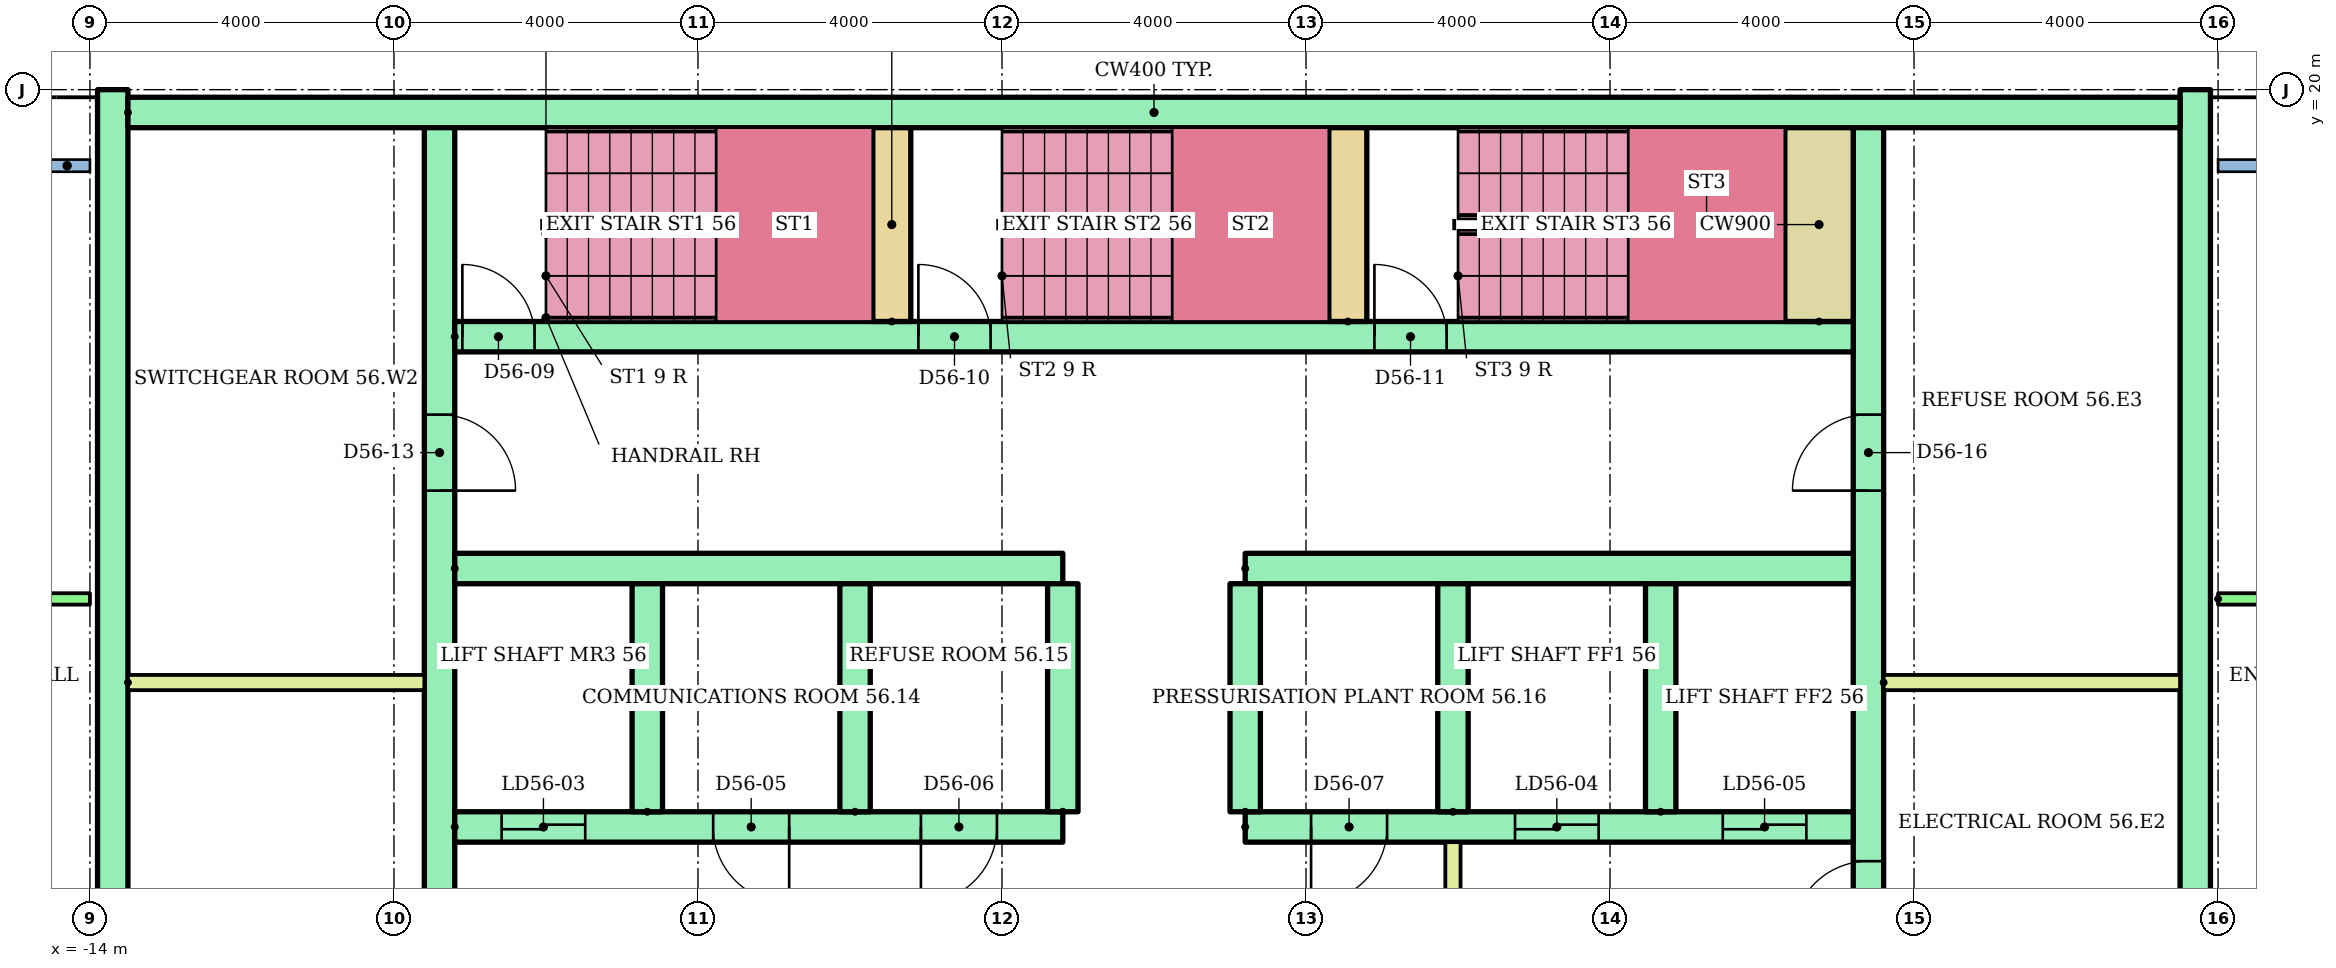
"""IFC4 building model, lengths in metres.
Left out: names, types, materials, properties, quantities, classifications, styles, units other than length and angle.
Written with IfcOpenShell. Run it as: python <this file> out.ifc"""

import sys

from ifc_helpers import new_model, si_unit, direction, frame, frame_2d, origin, place, context, subcontext, project, spatial, rectangle, extrude, element, fill, save


model = new_model("IFC4")
c1 = context("Model", 3, precision=1e-05, world=origin(), true_north=direction((0.0, 1.0)))
c2 = subcontext(c1, "Body", "Model", "MODEL_VIEW")
j1 = project(units=[si_unit("LENGTHUNIT", "METRE"), si_unit("PLANEANGLEUNIT", "RADIAN")], contexts=[c1])
p1 = place(None, origin())
s1 = spatial("IfcSite", under=j1, at=p1, CompositionType="ELEMENT")
p2 = place(p1, origin())
s2 = spatial("IfcBuilding", under=s1, at=p2, CompositionType="ELEMENT")
p3 = place(p2, frame((0.0, 0.0, 217.2)))
s3 = spatial("IfcBuildingStorey", under=s2, at=p3, CompositionType="ELEMENT", Elevation=217.2)
for number, where, z_axis, x_axis in (
    (1, (-13.7, 3.0, 0.0), (0.0, 0.0, 1.0), (0.0, 1.0, 0.0)),
    (2, (13.7, 3.0, 0.0), (0.0, 0.0, 1.0), (0.0, 1.0, 0.0)),
):
    element("IfcWall", number, at=place(p3, frame(where, z_axis=z_axis, x_axis=x_axis)), inside=s3, PredefinedType="SHEAR", context=c2, shape_type="SweptSolid", body=[
        extrude(rectangle(XDim=17.0, YDim=0.4, at=frame_2d((8.5, 0.0))), origin(), (0.0, 0.0, 1.0), 2.92),
    ])
p4 = place(p3, frame((-13.5, 19.7, 0.0)))
e3 = element("IfcWall", 3, at=p4, inside=s3, PredefinedType="SHEAR", context=c2, shape_type="SweptSolid", body=[
    extrude(rectangle(XDim=27.0, YDim=0.4, at=frame_2d((13.5, 0.0))), origin(), (0.0, 0.0, 1.0), 2.92),
])
p5 = place(p3, frame((-9.4, 6.8, 0.0), z_axis=(0.0, 0.0, 1.0), x_axis=(0.0, 1.0, 0.0)))
e4 = element("IfcWall", 4, at=p5, inside=s3, PredefinedType="SHEAR", context=c2, shape_type="SweptSolid", body=[
    extrude(rectangle(XDim=12.7, YDim=0.4, at=frame_2d((6.35, 0.0))), origin(), (0.0, 0.0, 1.0), 2.92),
])
p6 = place(p5, frame((1.15, 0.0, 0.0)))
e5 = element("IfcOpeningElement", 5, at=p6, cuts=e4, PredefinedType="OPENING", context=c2, shape_type="SweptSolid", body=[
    extrude(rectangle(XDim=1.0, YDim=2.1, at=frame_2d((0.5, 1.05))), frame((0.0, 0.21, 0.0), z_axis=(0.0, -1.0, 0.0), x_axis=(1.0, 0.0, 0.0)), (0.0, 0.0, 1.0), 0.42),
])
p7 = place(p5, frame((7.925, 0.0, 0.0)))
e6 = element("IfcOpeningElement", 6, at=p7, cuts=e4, PredefinedType="OPENING", context=c2, shape_type="SweptSolid", body=[
    extrude(rectangle(XDim=1.0, YDim=2.1, at=frame_2d((0.5, 1.05))), frame((0.0, 0.21, 0.0), z_axis=(0.0, -1.0, 0.0), x_axis=(1.0, 0.0, 0.0)), (0.0, 0.0, 1.0), 0.42),
])
p8 = place(p3, frame((9.4, 6.8, 0.0), z_axis=(0.0, 0.0, 1.0), x_axis=(0.0, 1.0, 0.0)))
e7 = element("IfcWall", 7, at=p8, inside=s3, PredefinedType="SHEAR", context=c2, shape_type="SweptSolid", body=[
    extrude(rectangle(XDim=12.7, YDim=0.4, at=frame_2d((6.35, 0.0))), origin(), (0.0, 0.0, 1.0), 2.92),
])
p9 = place(p8, frame((0.3, 0.0, 0.0)))
e8 = element("IfcOpeningElement", 8, at=p9, cuts=e7, PredefinedType="OPENING", context=c2, shape_type="SweptSolid", body=[
    extrude(rectangle(XDim=1.0, YDim=2.1, at=frame_2d((0.5, 1.05))), frame((0.0, 0.21, 0.0), z_axis=(0.0, -1.0, 0.0), x_axis=(1.0, 0.0, 0.0)), (0.0, 0.0, 1.0), 0.42),
])
p10 = place(p8, frame((2.05, 0.0, 0.0)))
e9 = element("IfcOpeningElement", 9, at=p10, cuts=e7, PredefinedType="OPENING", context=c2, shape_type="SweptSolid", body=[
    extrude(rectangle(XDim=1.0, YDim=2.1, at=frame_2d((0.5, 1.05))), frame((0.0, 0.21, 0.0), z_axis=(0.0, -1.0, 0.0), x_axis=(1.0, 0.0, 0.0)), (0.0, 0.0, 1.0), 0.42),
])
p11 = place(p8, frame((7.925, 0.0, 0.0)))
e10 = element("IfcOpeningElement", 10, at=p11, cuts=e7, PredefinedType="OPENING", context=c2, shape_type="SweptSolid", body=[
    extrude(rectangle(XDim=1.0, YDim=2.1, at=frame_2d((0.5, 1.05))), frame((0.0, 0.21, 0.0), z_axis=(0.0, -1.0, 0.0), x_axis=(1.0, 0.0, 0.0)), (0.0, 0.0, 1.0), 0.42),
])
p12 = place(p3, frame((-9.2, 10.3, 0.0)))
e11 = element("IfcWall", 11, at=p12, inside=s3, PredefinedType="SHEAR", context=c2, shape_type="SweptSolid", body=[
    extrude(rectangle(XDim=8.0, YDim=0.4, at=frame_2d((4.0, 0.0))), origin(), (0.0, 0.0, 1.0), 2.92),
])
p13 = place(p12, frame((0.617, 0.0, 0.0)))
e12 = element("IfcOpeningElement", 12, at=p13, cuts=e11, PredefinedType="OPENING", context=c2, shape_type="SweptSolid", body=[
    extrude(rectangle(XDim=1.1, YDim=2.1, at=frame_2d((0.55, 1.05))), frame((0.0, 0.21, 0.0), z_axis=(0.0, -1.0, 0.0), x_axis=(1.0, 0.0, 0.0)), (0.0, 0.0, 1.0), 0.42),
])
p14 = place(p12, frame((3.4, 0.0, 0.0)))
e13 = element("IfcOpeningElement", 13, at=p14, cuts=e11, PredefinedType="OPENING", context=c2, shape_type="SweptSolid", body=[
    extrude(rectangle(XDim=1.0, YDim=2.1, at=frame_2d((0.5, 1.05))), frame((0.0, 0.21, 0.0), z_axis=(0.0, -1.0, 0.0), x_axis=(1.0, 0.0, 0.0)), (0.0, 0.0, 1.0), 0.42),
])
p15 = place(p12, frame((6.133, 0.0, 0.0)))
e14 = element("IfcOpeningElement", 14, at=p15, cuts=e11, PredefinedType="OPENING", context=c2, shape_type="SweptSolid", body=[
    extrude(rectangle(XDim=1.0, YDim=2.1, at=frame_2d((0.5, 1.05))), frame((0.0, 0.21, 0.0), z_axis=(0.0, -1.0, 0.0), x_axis=(1.0, 0.0, 0.0)), (0.0, 0.0, 1.0), 0.42),
])
p16 = place(p3, frame((-9.2, 13.7, 0.0)))
e15 = element("IfcWall", 15, at=p16, inside=s3, PredefinedType="SHEAR", context=c2, shape_type="SweptSolid", body=[
    extrude(rectangle(XDim=8.0, YDim=0.4, at=frame_2d((4.0, 0.0))), origin(), (0.0, 0.0, 1.0), 2.92),
])
p17 = place(p3, frame((1.2, 10.3, 0.0)))
e16 = element("IfcWall", 16, at=p17, inside=s3, PredefinedType="SHEAR", context=c2, shape_type="SweptSolid", body=[
    extrude(rectangle(XDim=8.0, YDim=0.4, at=frame_2d((4.0, 0.0))), origin(), (0.0, 0.0, 1.0), 2.92),
])
p18 = place(p17, frame((3.55, 0.0, 0.0)))
e17 = element("IfcOpeningElement", 17, at=p18, cuts=e16, PredefinedType="OPENING", context=c2, shape_type="SweptSolid", body=[
    extrude(rectangle(XDim=1.1, YDim=2.1, at=frame_2d((0.55, 1.05))), frame((0.0, 0.21, 0.0), z_axis=(0.0, -1.0, 0.0), x_axis=(1.0, 0.0, 0.0)), (0.0, 0.0, 1.0), 0.42),
])
p19 = place(p17, frame((6.283, 0.0, 0.0)))
e18 = element("IfcOpeningElement", 18, at=p19, cuts=e16, PredefinedType="OPENING", context=c2, shape_type="SweptSolid", body=[
    extrude(rectangle(XDim=1.1, YDim=2.1, at=frame_2d((0.55, 1.05))), frame((0.0, 0.21, 0.0), z_axis=(0.0, -1.0, 0.0), x_axis=(1.0, 0.0, 0.0)), (0.0, 0.0, 1.0), 0.42),
])
p20 = place(p17, frame((0.867, 0.0, 0.0)))
e19 = element("IfcOpeningElement", 19, at=p20, cuts=e16, PredefinedType="OPENING", context=c2, shape_type="SweptSolid", body=[
    extrude(rectangle(XDim=1.0, YDim=2.1, at=frame_2d((0.5, 1.05))), frame((0.0, 0.21, 0.0), z_axis=(0.0, -1.0, 0.0), x_axis=(1.0, 0.0, 0.0)), (0.0, 0.0, 1.0), 0.42),
])
p21 = place(p3, frame((1.2, 13.7, 0.0)))
e20 = element("IfcWall", 20, at=p21, inside=s3, PredefinedType="SHEAR", context=c2, shape_type="SweptSolid", body=[
    extrude(rectangle(XDim=8.0, YDim=0.4, at=frame_2d((4.0, 0.0))), origin(), (0.0, 0.0, 1.0), 2.92),
])
for number, where, z_axis, x_axis in (
    (21, (-6.667, 10.5, 0.0), (0.0, 0.0, 1.0), (0.0, 1.0, 0.0)),
    (22, (-3.933, 10.5, 0.0), (0.0, 0.0, 1.0), (0.0, 1.0, 0.0)),
    (23, (-1.2, 10.5, 0.0), (0.0, 0.0, 1.0), (0.0, 1.0, 0.0)),
    (24, (1.2, 10.5, 0.0), (0.0, 0.0, 1.0), (0.0, 1.0, 0.0)),
    (25, (3.933, 10.5, 0.0), (0.0, 0.0, 1.0), (0.0, 1.0, 0.0)),
    (26, (6.667, 10.5, 0.0), (0.0, 0.0, 1.0), (0.0, 1.0, 0.0)),
):
    element("IfcWall", number, at=place(p3, frame(where, z_axis=z_axis, x_axis=x_axis)), inside=s3, PredefinedType="SHEAR", context=c2, shape_type="SweptSolid", body=[
        extrude(rectangle(XDim=3.0, YDim=0.4, at=frame_2d((1.5, 0.0))), origin(), (0.0, 0.0, 1.0), 2.92),
    ])
p22 = place(p3, frame((3.933, 6.8, 0.0), z_axis=(0.0, 0.0, 1.0), x_axis=(0.0, 1.0, 0.0)))
e27 = element("IfcWall", 27, at=p22, inside=s3, PredefinedType="PARTITIONING", context=c2, shape_type="SweptSolid", body=[
    extrude(rectangle(XDim=3.3, YDim=0.2, at=frame_2d((1.65, 0.0))), origin(), (0.0, 0.0, 1.0), 2.92),
])
p23 = place(p22, frame((1.1, 0.0, 0.0)))
e28 = element("IfcOpeningElement", 28, at=p23, cuts=e27, PredefinedType="OPENING", context=c2, shape_type="SweptSolid", body=[
    extrude(rectangle(XDim=1.1, YDim=2.1, at=frame_2d((0.55, 1.05))), frame((0.0, 0.11, 0.0), z_axis=(0.0, -1.0, 0.0), x_axis=(1.0, 0.0, 0.0)), (0.0, 0.0, 1.0), 0.22),
])
p24 = place(p3, frame((-9.2, 16.75, 0.0)))
e29 = element("IfcWall", 29, at=p24, inside=s3, PredefinedType="SHEAR", context=c2, shape_type="SweptSolid", body=[
    extrude(rectangle(XDim=18.4, YDim=0.4, at=frame_2d((9.2, 0.0))), origin(), (0.0, 0.0, 1.0), 2.92),
])
p25 = place(p24, frame((0.1, 0.0, 0.0)))
e30 = element("IfcOpeningElement", 30, at=p25, cuts=e29, PredefinedType="OPENING", context=c2, shape_type="SweptSolid", body=[
    extrude(rectangle(XDim=0.95, YDim=2.1, at=frame_2d((0.475, 1.05))), frame((0.0, 0.21, 0.0), z_axis=(0.0, -1.0, 0.0), x_axis=(1.0, 0.0, 0.0)), (0.0, 0.0, 1.0), 0.42),
])
p26 = place(p24, frame((6.1, 0.0, 0.0)))
e31 = element("IfcOpeningElement", 31, at=p26, cuts=e29, PredefinedType="OPENING", context=c2, shape_type="SweptSolid", body=[
    extrude(rectangle(XDim=0.95, YDim=2.1, at=frame_2d((0.475, 1.05))), frame((0.0, 0.21, 0.0), z_axis=(0.0, -1.0, 0.0), x_axis=(1.0, 0.0, 0.0)), (0.0, 0.0, 1.0), 0.42),
])
p27 = place(p24, frame((12.1, 0.0, 0.0)))
e32 = element("IfcOpeningElement", 32, at=p27, cuts=e29, PredefinedType="OPENING", context=c2, shape_type="SweptSolid", body=[
    extrude(rectangle(XDim=0.95, YDim=2.1, at=frame_2d((0.475, 1.05))), frame((0.0, 0.21, 0.0), z_axis=(0.0, -1.0, 0.0), x_axis=(1.0, 0.0, 0.0)), (0.0, 0.0, 1.0), 0.42),
])
for number, where, z_axis, x_axis in (
    (33, (-3.45, 16.95, 0.0), (0.0, 0.0, 1.0), (0.0, 1.0, 0.0)),
    (34, (2.55, 16.95, 0.0), (0.0, 0.0, 1.0), (0.0, 1.0, 0.0)),
):
    element("IfcWall", number, at=place(p3, frame(where, z_axis=z_axis, x_axis=x_axis)), inside=s3, PredefinedType="SHEAR", context=c2, shape_type="SweptSolid", body=[
        extrude(rectangle(XDim=2.55, YDim=0.5, at=frame_2d((1.275, 0.0))), origin(), (0.0, 0.0, 1.0), 2.92),
    ])
p28 = place(p3, frame((8.75, 16.95, 0.0), z_axis=(0.0, 0.0, 1.0), x_axis=(0.0, 1.0, 0.0)))
e35 = element("IfcWall", 35, at=p28, inside=s3, PredefinedType="SHEAR", context=c2, shape_type="SweptSolid", body=[
    extrude(rectangle(XDim=2.55, YDim=0.9, at=frame_2d((1.275, 0.0))), origin(), (0.0, 0.0, 1.0), 2.92),
])
for number, where in (
    (36, (-13.5, 12.2, 0.0)),
    (37, (9.6, 12.2, 0.0)),
):
    element("IfcWall", number, at=place(p3, frame(where)), inside=s3, PredefinedType="PARTITIONING", context=c2, shape_type="SweptSolid", body=[
        extrude(rectangle(XDim=3.9, YDim=0.2, at=frame_2d((1.95, 0.0))), origin(), (0.0, 0.0, 1.0), 2.92),
    ])
p29 = place(p3, frame((-28.92, 13.3, 0.0)))
e38 = element("IfcWall", 38, at=p29, inside=s3, PredefinedType="PARTITIONING", context=c2, shape_type="SweptSolid", body=[
    extrude(rectangle(XDim=14.92, YDim=0.15, at=frame_2d((7.46, 0.0))), origin(), (0.0, 0.0, 1.0), 2.4),
])
p30 = place(p29, frame((1.97, 0.0, 0.0)))
e39 = element("IfcOpeningElement", 39, at=p30, cuts=e38, PredefinedType="OPENING", context=c2, shape_type="SweptSolid", body=[
    extrude(rectangle(XDim=1.0, YDim=2.1, at=frame_2d((0.5, 1.05))), frame((0.0, 0.085, 0.0), z_axis=(0.0, -1.0, 0.0), x_axis=(1.0, 0.0, 0.0)), (0.0, 0.0, 1.0), 0.17),
])
p31 = place(p29, frame((9.32, 0.0, 0.0)))
e40 = element("IfcOpeningElement", 40, at=p31, cuts=e38, PredefinedType="OPENING", context=c2, shape_type="SweptSolid", body=[
    extrude(rectangle(XDim=1.0, YDim=2.1, at=frame_2d((0.5, 1.05))), frame((0.0, 0.085, 0.0), z_axis=(0.0, -1.0, 0.0), x_axis=(1.0, 0.0, 0.0)), (0.0, 0.0, 1.0), 0.17),
])
p32 = place(p3, frame((14.0, 13.3, 0.0)))
e41 = element("IfcWall", 41, at=p32, inside=s3, PredefinedType="PARTITIONING", context=c2, shape_type="SweptSolid", body=[
    extrude(rectangle(XDim=14.92, YDim=0.15, at=frame_2d((7.46, 0.0))), origin(), (0.0, 0.0, 1.0), 2.4),
])
p33 = place(p32, frame((1.55, 0.0, 0.0)))
e42 = element("IfcOpeningElement", 42, at=p33, cuts=e41, PredefinedType="OPENING", context=c2, shape_type="SweptSolid", body=[
    extrude(rectangle(XDim=0.9, YDim=2.1, at=frame_2d((0.45, 1.05))), frame((0.0, 0.085, 0.0), z_axis=(0.0, -1.0, 0.0), x_axis=(1.0, 0.0, 0.0)), (0.0, 0.0, 1.0), 0.17),
])
p34 = place(p32, frame((8.85, 0.0, 0.0)))
e43 = element("IfcOpeningElement", 43, at=p34, cuts=e41, PredefinedType="OPENING", context=c2, shape_type="SweptSolid", body=[
    extrude(rectangle(XDim=1.0, YDim=2.1, at=frame_2d((0.5, 1.05))), frame((0.0, 0.085, 0.0), z_axis=(0.0, -1.0, 0.0), x_axis=(1.0, 0.0, 0.0)), (0.0, 0.0, 1.0), 0.17),
])
p35 = place(p13, origin())
e44 = element("IfcDoor", 44, at=p35, inside=s3, OperationType="SLIDING_TO_LEFT", PredefinedType="DOOR", context=c2, shape_type="SweptSolid", body=[
    extrude(rectangle(XDim=1.1, YDim=2.1, at=frame_2d((0.55, 1.05))), frame((0.0, 0.025, 0.0), z_axis=(0.0, -1.0, 0.0), x_axis=(1.0, 0.0, 0.0)), (0.0, 0.0, 1.0), 0.05),
])
fill(e12, e44)
p36 = place(p18, origin())
e45 = element("IfcDoor", 45, at=p36, inside=s3, OperationType="SLIDING_TO_LEFT", PredefinedType="DOOR", context=c2, shape_type="SweptSolid", body=[
    extrude(rectangle(XDim=1.1, YDim=2.1, at=frame_2d((0.55, 1.05))), frame((0.0, 0.025, 0.0), z_axis=(0.0, -1.0, 0.0), x_axis=(1.0, 0.0, 0.0)), (0.0, 0.0, 1.0), 0.05),
])
fill(e17, e45)
p37 = place(p19, origin())
e46 = element("IfcDoor", 46, at=p37, inside=s3, OperationType="SLIDING_TO_LEFT", PredefinedType="DOOR", context=c2, shape_type="SweptSolid", body=[
    extrude(rectangle(XDim=1.1, YDim=2.1, at=frame_2d((0.55, 1.05))), frame((0.0, 0.025, 0.0), z_axis=(0.0, -1.0, 0.0), x_axis=(1.0, 0.0, 0.0)), (0.0, 0.0, 1.0), 0.05),
])
fill(e18, e46)
p38 = place(p14, frame((1.0, 0.0, 0.0), z_axis=(0.0, 0.0, 1.0), x_axis=(-1.0, 0.0, 0.0)))
e47 = element("IfcDoor", 47, at=p38, inside=s3, OperationType="SINGLE_SWING_RIGHT", PredefinedType="DOOR", context=c2, shape_type="SweptSolid", body=[
    extrude(rectangle(XDim=1.0, YDim=2.1, at=frame_2d((0.5, 1.05))), frame((0.0, 0.025, 0.0), z_axis=(0.0, -1.0, 0.0), x_axis=(1.0, 0.0, 0.0)), (0.0, 0.0, 1.0), 0.05),
])
fill(e13, e47)
p39 = place(p15, frame((1.0, 0.0, 0.0), z_axis=(0.0, 0.0, 1.0), x_axis=(-1.0, 0.0, 0.0)))
e48 = element("IfcDoor", 48, at=p39, inside=s3, OperationType="SINGLE_SWING_LEFT", PredefinedType="DOOR", context=c2, shape_type="SweptSolid", body=[
    extrude(rectangle(XDim=1.0, YDim=2.1, at=frame_2d((0.5, 1.05))), frame((0.0, 0.025, 0.0), z_axis=(0.0, -1.0, 0.0), x_axis=(1.0, 0.0, 0.0)), (0.0, 0.0, 1.0), 0.05),
])
fill(e14, e48)
p40 = place(p20, frame((1.0, 0.0, 0.0), z_axis=(0.0, 0.0, 1.0), x_axis=(-1.0, 0.0, 0.0)))
e49 = element("IfcDoor", 49, at=p40, inside=s3, OperationType="SINGLE_SWING_LEFT", PredefinedType="DOOR", context=c2, shape_type="SweptSolid", body=[
    extrude(rectangle(XDim=1.0, YDim=2.1, at=frame_2d((0.5, 1.05))), frame((0.0, 0.025, 0.0), z_axis=(0.0, -1.0, 0.0), x_axis=(1.0, 0.0, 0.0)), (0.0, 0.0, 1.0), 0.05),
])
fill(e19, e49)
p41 = place(p25, origin())
e50 = element("IfcDoor", 50, at=p41, inside=s3, OperationType="SINGLE_SWING_LEFT", PredefinedType="DOOR", context=c2, shape_type="SweptSolid", body=[
    extrude(rectangle(XDim=0.95, YDim=2.1, at=frame_2d((0.475, 1.05))), frame((0.0, 0.025, 0.0), z_axis=(0.0, -1.0, 0.0), x_axis=(1.0, 0.0, 0.0)), (0.0, 0.0, 1.0), 0.05),
])
fill(e30, e50)
p42 = place(p26, origin())
e51 = element("IfcDoor", 51, at=p42, inside=s3, OperationType="SINGLE_SWING_LEFT", PredefinedType="DOOR", context=c2, shape_type="SweptSolid", body=[
    extrude(rectangle(XDim=0.95, YDim=2.1, at=frame_2d((0.475, 1.05))), frame((0.0, 0.025, 0.0), z_axis=(0.0, -1.0, 0.0), x_axis=(1.0, 0.0, 0.0)), (0.0, 0.0, 1.0), 0.05),
])
fill(e31, e51)
p43 = place(p27, origin())
e52 = element("IfcDoor", 52, at=p43, inside=s3, OperationType="SINGLE_SWING_LEFT", PredefinedType="DOOR", context=c2, shape_type="SweptSolid", body=[
    extrude(rectangle(XDim=0.95, YDim=2.1, at=frame_2d((0.475, 1.05))), frame((0.0, 0.025, 0.0), z_axis=(0.0, -1.0, 0.0), x_axis=(1.0, 0.0, 0.0)), (0.0, 0.0, 1.0), 0.05),
])
fill(e32, e52)
p44 = place(p7, frame((1.0, 0.0, 0.0), z_axis=(0.0, 0.0, 1.0), x_axis=(-1.0, 0.0, 0.0)))
e53 = element("IfcDoor", 53, at=p44, inside=s3, OperationType="SINGLE_SWING_LEFT", PredefinedType="DOOR", context=c2, shape_type="SweptSolid", body=[
    extrude(rectangle(XDim=1.0, YDim=2.1, at=frame_2d((0.5, 1.05))), frame((0.0, 0.025, 0.0), z_axis=(0.0, -1.0, 0.0), x_axis=(1.0, 0.0, 0.0)), (0.0, 0.0, 1.0), 0.05),
])
fill(e6, e53)
p45 = place(p10, origin())
e54 = element("IfcDoor", 54, at=p45, inside=s3, OperationType="SINGLE_SWING_LEFT", PredefinedType="DOOR", context=c2, shape_type="SweptSolid", body=[
    extrude(rectangle(XDim=1.0, YDim=2.1, at=frame_2d((0.5, 1.05))), frame((0.0, 0.025, 0.0), z_axis=(0.0, -1.0, 0.0), x_axis=(1.0, 0.0, 0.0)), (0.0, 0.0, 1.0), 0.05),
])
fill(e9, e54)
p46 = place(p11, origin())
e55 = element("IfcDoor", 55, at=p46, inside=s3, OperationType="SINGLE_SWING_LEFT", PredefinedType="DOOR", context=c2, shape_type="SweptSolid", body=[
    extrude(rectangle(XDim=1.0, YDim=2.1, at=frame_2d((0.5, 1.05))), frame((0.0, 0.025, 0.0), z_axis=(0.0, -1.0, 0.0), x_axis=(1.0, 0.0, 0.0)), (0.0, 0.0, 1.0), 0.05),
])
fill(e10, e55)
save(model, sys.argv[1])
